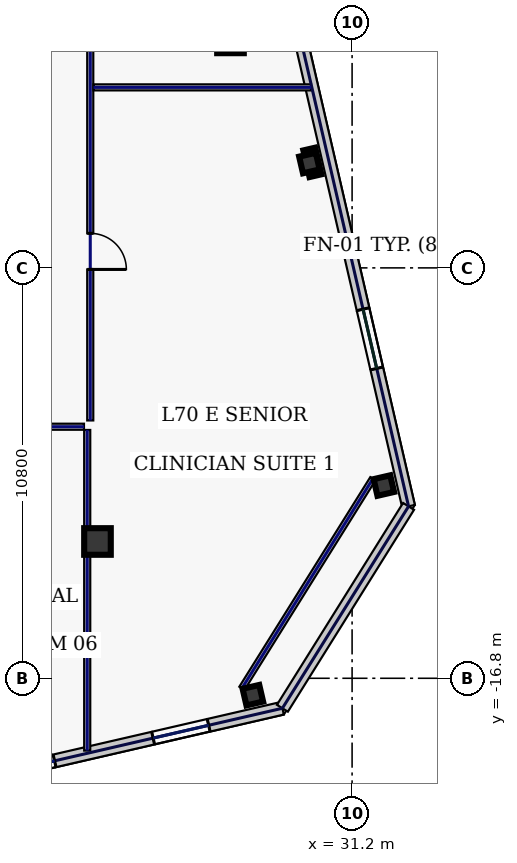
"""IFC4 building model, lengths in metres.
Left out: names, types, materials, properties, quantities, classifications, styles, units other than length and angle.
Written with IfcOpenShell. Run it as: python <this file> out.ifc"""

import sys

from ifc_helpers import new_model, si_unit, direction, frame, frame_2d, origin, origin_2d, place, context, subcontext, project, spatial, rectangle, hollow_rectangle, extrude, element, fill, save


model = new_model("IFC4")
c1 = context("Model", 3, precision=1e-05, world=origin(), true_north=direction((0.0, 1.0)))
c2 = subcontext(c1, "Body", "Model", "MODEL_VIEW")
j1 = project(units=[si_unit("LENGTHUNIT", "METRE"), si_unit("PLANEANGLEUNIT", "RADIAN")], contexts=[c1])
p1 = place(None, origin())
s1 = spatial("IfcSite", under=j1, at=p1, CompositionType="ELEMENT")
p2 = place(p1, origin())
s2 = spatial("IfcBuilding", under=s1, at=p2, CompositionType="ELEMENT")
p3 = place(p2, frame((0.0, 0.0, 301.0)))
s3 = spatial("IfcBuildingStorey", under=s2, at=p3, CompositionType="ELEMENT", Elevation=301.0)
for number, where, z_axis, x_axis in (
    (1, (24.5, -13.2, 0.0), (0.0, 0.0, 1.0), (1.0, 0.0, 0.0)),
    (2, (28.0, 0.0, 0.0), (0.0, 0.0, 1.0), (1.0, 0.0, 0.0)),
):
    element("IfcColumn", number, at=place(p3, frame(where, z_axis=z_axis, x_axis=x_axis)), inside=s3, PredefinedType="COLUMN", context=c2, shape_type="SweptSolid", body=[
        extrude(hollow_rectangle(XDim=0.7, YDim=0.7, WallThickness=0.032, at=origin_2d()), origin(), (0.0, 0.0, 1.0), 3.74),
    ])
for number, where, z_axis, x_axis in (
    (3, (28.589, -17.245, 0.0), (0.0, 0.0, 1.0), (0.974, 0.225, 0.0)),
    (4, (32.036, -11.728, 0.0), (0.0, 0.0, 1.0), (0.974, 0.225, 0.0)),
    (5, (30.077, -3.241, 0.0), (0.0, 0.0, 1.0), (0.974, 0.225, 0.0)),
):
    element("IfcColumn", number, at=place(p3, frame(where, z_axis=z_axis, x_axis=x_axis)), inside=s3, PredefinedType="COLUMN", context=c2, shape_type="SweptSolid", body=[
        extrude(hollow_rectangle(XDim=0.45, YDim=0.45, WallThickness=0.022, at=origin_2d()), origin(), (0.0, 0.0, 1.0), 3.74),
    ])
p4 = place(p3, frame((12.445, -21.495, 0.0), z_axis=(0.0, 0.0, 1.0), x_axis=(0.974369392164, 0.224953967767, 0.0)))
e6 = element("IfcWall", 6, at=p4, inside=s3, PredefinedType="STANDARD", context=c2, shape_type="SweptSolid", body=[
    extrude(rectangle(XDim=17.366, YDim=0.34, at=frame_2d((8.683, 0.0))), origin(), (0.0, 0.0, 1.0), 3.74),
])
p5 = place(p4, frame((2.729, 0.0, 0.9)))
e7 = element("IfcOpeningElement", 7, at=p5, cuts=e6, PredefinedType="OPENING", context=c2, shape_type="SweptSolid", body=[
    extrude(rectangle(XDim=1.5, YDim=2.0, at=frame_2d((0.75, 1.0))), frame((0.0, 0.18, 0.0), z_axis=(0.0, -1.0, 0.0), x_axis=(1.0, 0.0, 0.0)), (0.0, 0.0, 1.0), 0.36),
])
p6 = place(p4, frame((6.24, 0.0, 0.9)))
e8 = element("IfcOpeningElement", 8, at=p6, cuts=e6, PredefinedType="OPENING", context=c2, shape_type="SweptSolid", body=[
    extrude(rectangle(XDim=1.5, YDim=2.0, at=frame_2d((0.75, 1.0))), frame((0.0, 0.18, 0.0), z_axis=(0.0, -1.0, 0.0), x_axis=(1.0, 0.0, 0.0)), (0.0, 0.0, 1.0), 0.36),
])
p7 = place(p4, frame((10.363, 0.0, 0.9)))
e9 = element("IfcOpeningElement", 9, at=p7, cuts=e6, PredefinedType="OPENING", context=c2, shape_type="SweptSolid", body=[
    extrude(rectangle(XDim=0.85, YDim=1.85, at=frame_2d((0.425, 0.925))), frame((0.0, 0.18, 0.0), z_axis=(0.0, -1.0, 0.0), x_axis=(1.0, 0.0, 0.0)), (0.0, 0.0, 1.0), 0.36),
])
p8 = place(p4, frame((13.875, 0.0, 0.9)))
e10 = element("IfcOpeningElement", 10, at=p8, cuts=e6, PredefinedType="OPENING", context=c2, shape_type="SweptSolid", body=[
    extrude(rectangle(XDim=1.5, YDim=2.0, at=frame_2d((0.75, 1.0))), frame((0.0, 0.18, 0.0), z_axis=(0.0, -1.0, 0.0), x_axis=(1.0, 0.0, 0.0)), (0.0, 0.0, 1.0), 0.36),
])
p9 = place(p3, frame((32.686, -12.276, 0.0), z_axis=(0.0, 0.0, 1.0), x_axis=(-0.224953091034, 0.974369594576, 0.0)))
e11 = element("IfcWall", 11, at=p9, inside=s3, PredefinedType="STANDARD", context=c2, shape_type="SweptSolid", body=[
    extrude(rectangle(XDim=36.2, YDim=0.34, at=frame_2d((18.1, 0.0))), origin(), (0.0, 0.0, 1.0), 3.74),
])
p10 = place(p9, frame((3.725, 0.0, 0.58)))
e12 = element("IfcOpeningElement", 12, at=p10, cuts=e11, PredefinedType="OPENING", context=c2, shape_type="SweptSolid", body=[
    extrude(rectangle(XDim=1.6, YDim=2.3, at=frame_2d((0.8, 1.15))), frame((0.0, 0.18, 0.0), z_axis=(0.0, -1.0, 0.0), x_axis=(1.0, 0.0, 0.0)), (0.0, 0.0, 1.0), 0.36),
])
p11 = place(p9, frame((12.775, 0.0, 0.58)))
e13 = element("IfcOpeningElement", 13, at=p11, cuts=e11, PredefinedType="OPENING", context=c2, shape_type="SweptSolid", body=[
    extrude(rectangle(XDim=1.6, YDim=2.3, at=frame_2d((0.8, 1.15))), frame((0.0, 0.18, 0.0), z_axis=(0.0, -1.0, 0.0), x_axis=(1.0, 0.0, 0.0)), (0.0, 0.0, 1.0), 0.36),
])
p12 = place(p9, frame((21.825, 0.0, 0.58)))
e14 = element("IfcOpeningElement", 14, at=p12, cuts=e11, PredefinedType="OPENING", context=c2, shape_type="SweptSolid", body=[
    extrude(rectangle(XDim=1.6, YDim=2.3, at=frame_2d((0.8, 1.15))), frame((0.0, 0.18, 0.0), z_axis=(0.0, -1.0, 0.0), x_axis=(1.0, 0.0, 0.0)), (0.0, 0.0, 1.0), 0.36),
])
p13 = place(p9, frame((30.875, 0.0, 0.58)))
e15 = element("IfcOpeningElement", 15, at=p13, cuts=e11, PredefinedType="OPENING", context=c2, shape_type="SweptSolid", body=[
    extrude(rectangle(XDim=1.6, YDim=2.3, at=frame_2d((0.8, 1.15))), frame((0.0, 0.18, 0.0), z_axis=(0.0, -1.0, 0.0), x_axis=(1.0, 0.0, 0.0)), (0.0, 0.0, 1.0), 0.36),
])
p14 = place(p3, frame((29.366, -17.589, 0.0), z_axis=(0.0, 0.0, 1.0), x_axis=(0.529907862057, 0.848055220921, 0.0)))
e16 = element("IfcWall", 16, at=p14, inside=s3, PredefinedType="STANDARD", context=c2, shape_type="SweptSolid", body=[
    extrude(rectangle(XDim=6.265, YDim=0.34, at=frame_2d((3.132, 0.0))), origin(), (0.0, 0.0, 1.0), 3.74),
])
p15 = place(p3, frame((28.3, -17.065, 0.0), z_axis=(0.0, 0.0, 1.0), x_axis=(0.529914601736, 0.848051009591, 0.0)))
e17 = element("IfcWall", 17, at=p15, inside=s3, PredefinedType="PARTITIONING", context=c2, shape_type="SweptSolid", body=[
    extrude(rectangle(XDim=6.505, YDim=0.16, at=frame_2d((3.253, 0.0))), origin(), (0.0, 0.0, 1.0), 3.74),
])
p16 = place(p3, frame((24.31, 10.115, 0.0), z_axis=(0.0, 0.0, 1.0), x_axis=(0.0, -1.0, 0.0)))
e18 = element("IfcWall", 18, at=p16, inside=s3, PredefinedType="PARTITIONING", context=c2, shape_type="SweptSolid", body=[
    extrude(rectangle(XDim=20.13, YDim=0.16, at=frame_2d((10.065, 0.0))), origin(), (0.0, 0.0, 1.0), 3.74),
])
p17 = place(p16, frame((15.206, 0.0, 0.0)))
e19 = element("IfcOpeningElement", 19, at=p17, cuts=e18, PredefinedType="OPENING", context=c2, shape_type="SweptSolid", body=[
    extrude(rectangle(XDim=0.95, YDim=2.2, at=frame_2d((0.475, 1.1))), frame((0.0, 0.09, 0.0), z_axis=(0.0, -1.0, 0.0), x_axis=(1.0, 0.0, 0.0)), (0.0, 0.0, 1.0), 0.18),
])
p18 = place(p16, frame((5.444, 0.0, 0.0)))
e20 = element("IfcOpeningElement", 20, at=p18, cuts=e18, PredefinedType="OPENING", context=c2, shape_type="SweptSolid", body=[
    extrude(rectangle(XDim=0.95, YDim=2.2, at=frame_2d((0.475, 1.1))), frame((0.0, 0.09, 0.0), z_axis=(0.0, -1.0, 0.0), x_axis=(1.0, 0.0, 0.0)), (0.0, 0.0, 1.0), 0.18),
])
p19 = place(p3, frame((24.145, -10.18, 0.0), z_axis=(0.0, 0.0, 1.0), x_axis=(-1.0, 0.0, 0.0)))
e21 = element("IfcWall", 21, at=p19, inside=s3, PredefinedType="PARTITIONING", context=c2, shape_type="SweptSolid", body=[
    extrude(rectangle(XDim=9.08, YDim=0.16, at=frame_2d((4.54, 0.0))), origin(), (0.0, 0.0, 1.0), 3.74),
])
p20 = place(p19, frame((2.934, 0.0, 0.0)))
e22 = element("IfcOpeningElement", 22, at=p20, cuts=e21, PredefinedType="OPENING", context=c2, shape_type="SweptSolid", body=[
    extrude(rectangle(XDim=0.95, YDim=2.2, at=frame_2d((0.475, 1.1))), frame((0.0, 0.09, 0.0), z_axis=(0.0, -1.0, 0.0), x_axis=(1.0, 0.0, 0.0)), (0.0, 0.0, 1.0), 0.18),
])
p21 = place(p3, frame((24.23, -18.703, 0.0), z_axis=(0.0, 0.0, 1.0), x_axis=(0.0, 1.0, 0.0)))
e23 = element("IfcWall", 23, at=p21, inside=s3, PredefinedType="PARTITIONING", context=c2, shape_type="SweptSolid", body=[
    extrude(rectangle(XDim=8.438, YDim=0.16, at=frame_2d((4.219, 0.0))), origin(), (0.0, 0.0, 1.0), 3.74),
])
p22 = place(p3, frame((24.395, -1.25, 0.0), z_axis=(0.0, 0.0, 1.0), x_axis=(1.0, 0.0, 0.0)))
e24 = element("IfcWall", 24, at=p22, inside=s3, PredefinedType="PARTITIONING", context=c2, shape_type="SweptSolid", body=[
    extrude(rectangle(XDim=5.725, YDim=0.16, at=frame_2d((2.862, 0.0))), origin(), (0.0, 0.0, 1.0), 3.74),
])
p23 = place(p7, origin())
e25 = element("IfcWindow", 25, at=p23, inside=s3, PartitioningType="SINGLE_PANEL", PredefinedType="WINDOW", context=c2, shape_type="SweptSolid", body=[
    extrude(rectangle(XDim=0.85, YDim=1.85, at=frame_2d((0.425, 0.925))), frame((0.0, 0.03, 0.0), z_axis=(0.0, -1.0, 0.0), x_axis=(1.0, 0.0, 0.0)), (0.0, 0.0, 1.0), 0.06),
])
fill(e9, e25)
p24 = place(p8, origin())
e26 = element("IfcWindow", 26, at=p24, inside=s3, PartitioningType="SINGLE_PANEL", PredefinedType="WINDOW", context=c2, shape_type="SweptSolid", body=[
    extrude(rectangle(XDim=1.5, YDim=2.0, at=frame_2d((0.75, 1.0))), frame((0.0, 0.03, 0.0), z_axis=(0.0, -1.0, 0.0), x_axis=(1.0, 0.0, 0.0)), (0.0, 0.0, 1.0), 0.06),
])
fill(e10, e26)
p25 = place(p10, origin())
e27 = element("IfcWindow", 27, at=p25, inside=s3, PartitioningType="SINGLE_PANEL", PredefinedType="WINDOW", context=c2, shape_type="SweptSolid", body=[
    extrude(rectangle(XDim=1.6, YDim=2.3, at=frame_2d((0.8, 1.15))), frame((0.0, 0.03, 0.0), z_axis=(0.0, -1.0, 0.0), x_axis=(1.0, 0.0, 0.0)), (0.0, 0.0, 1.0), 0.06),
])
fill(e12, e27)
p26 = place(p17, origin())
e28 = element("IfcDoor", 28, at=p26, inside=s3, OperationType="SINGLE_SWING_RIGHT", PredefinedType="DOOR", context=c2, shape_type="SweptSolid", body=[
    extrude(rectangle(XDim=0.95, YDim=2.2, at=frame_2d((0.475, 1.1))), frame((0.0, 0.025, 0.0), z_axis=(0.0, -1.0, 0.0), x_axis=(1.0, 0.0, 0.0)), (0.0, 0.0, 1.0), 0.05),
])
fill(e19, e28)
save(model, sys.argv[1])
